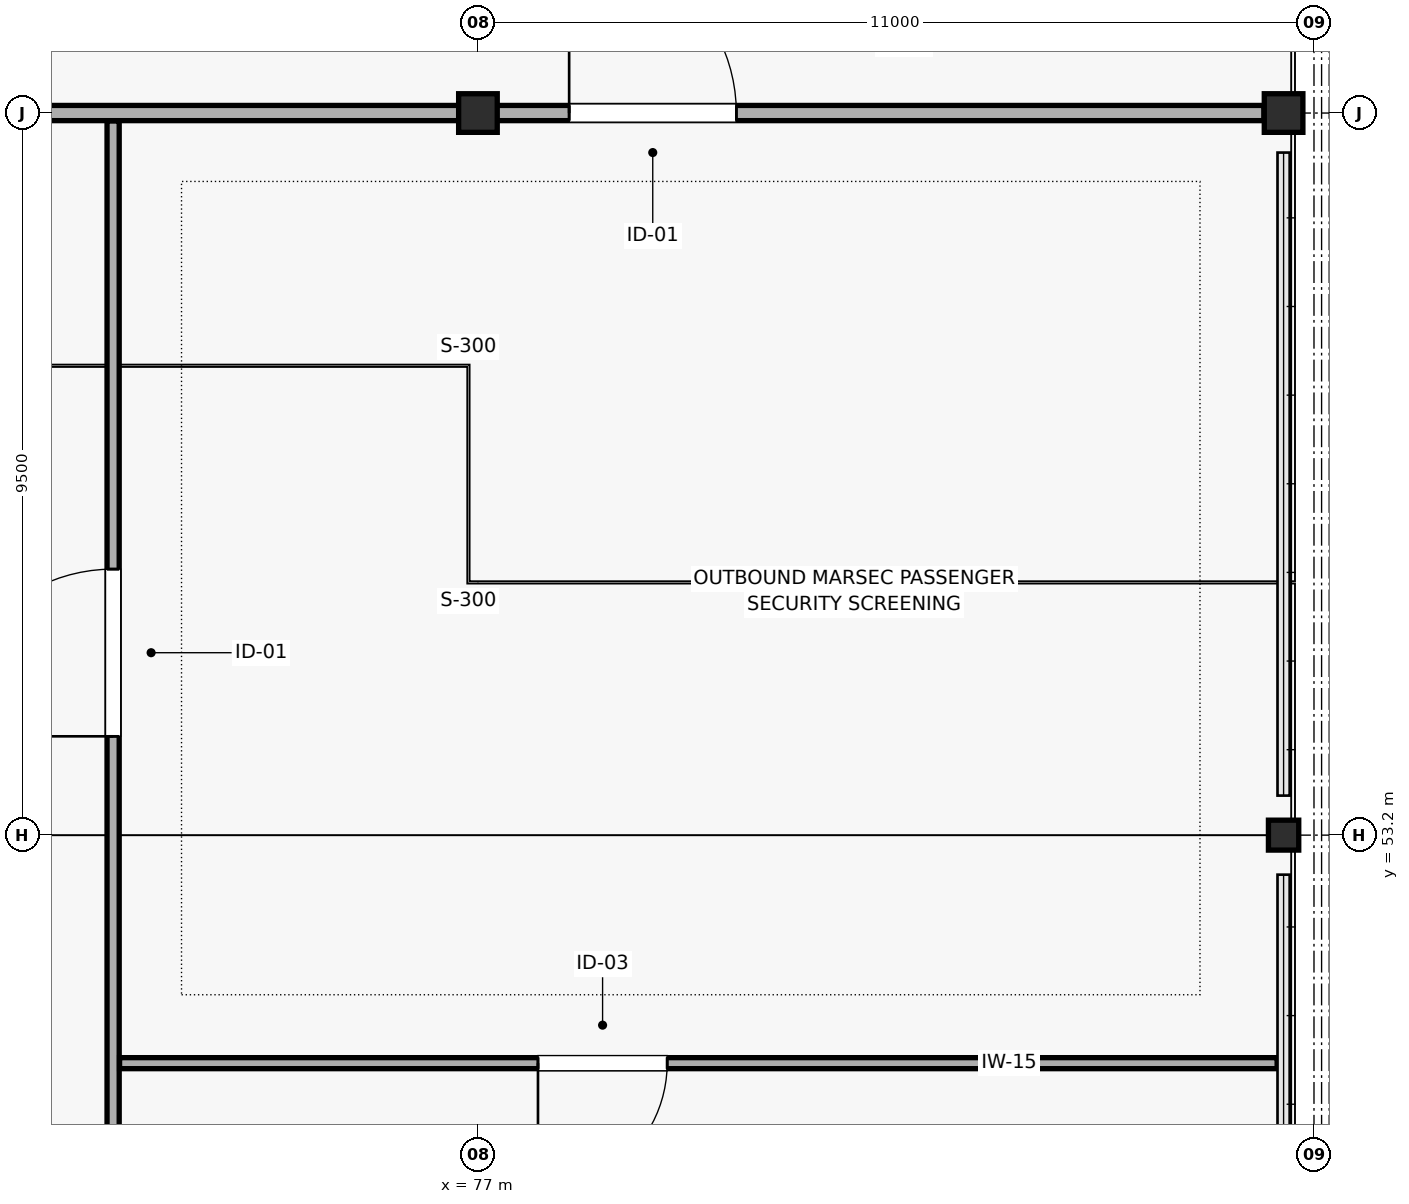
"""IFC4 building model, lengths in metres.
Left out: names, types, materials, properties, quantities, classifications, styles, units other than length and angle.
Written with IfcOpenShell. Run it as: python <this file> out.ifc"""

import sys

from ifc_helpers import new_model, si_unit, direction, frame, frame_2d, origin, origin_2d, place, context, subcontext, project, spatial, rectangle, hollow_circle, i_section, extrude, element, fill, save


model = new_model("IFC4")
c1 = context("Model", 3, precision=1e-05, world=origin(), true_north=direction((0.0, 1.0)))
c2 = subcontext(c1, "Body", "Model", "MODEL_VIEW")
j1 = project(units=[si_unit("LENGTHUNIT", "METRE"), si_unit("PLANEANGLEUNIT", "RADIAN")], contexts=[c1])
p1 = place(None, origin())
s1 = spatial("IfcSite", under=j1, at=p1, CompositionType="ELEMENT")
p2 = place(p1, origin())
s2 = spatial("IfcBuilding", under=s1, at=p2, CompositionType="ELEMENT")
p3 = place(p2, frame((0.0, 0.0, 5.4)))
s3 = spatial("IfcBuildingStorey", under=s2, at=p3, CompositionType="ELEMENT", Elevation=5.4)
for number, where, z_axis, x_axis in (
    (1, (77.0, 62.7, 0.0), (0.0, 0.0, 1.0), (1.0, 0.0, 0.0)),
    (2, (87.6, 62.7, 0.0), (0.0, 0.0, 1.0), (1.0, 0.0, 0.0)),
):
    element("IfcColumn", number, at=place(p3, frame(where, z_axis=z_axis, x_axis=x_axis)), inside=s3, PredefinedType="COLUMN", context=c2, shape_type="SweptSolid", body=[
        extrude(hollow_circle(Radius=0.254, WallThickness=0.012, at=origin_2d()), origin(), (0.0, 0.0, 1.0), 4.5),
    ])
p4 = place(p3, frame((87.6, 53.2, 0.0), z_axis=(0.0, 0.0, 1.0), x_axis=(1.0, 0.0, 0.0)))
e3 = element("IfcColumn", 3, at=p4, inside=s3, PredefinedType="COLUMN", context=c2, shape_type="SweptSolid", body=[
    extrude(i_section(OverallWidth=0.399, OverallDepth=0.394, WebThickness=0.023, FlangeThickness=0.037, FilletRadius=0.018, at=origin_2d()), origin(), (0.0, 0.0, 1.0), 4.5),
])
p5 = place(p3, frame((0.259, 62.7, 0.0), z_axis=(0.0, 0.0, 1.0), x_axis=(1.0, 0.0, 0.0)))
e4 = element("IfcWall", 4, at=p5, inside=s3, PredefinedType="PARTITIONING", context=c2, shape_type="SweptSolid", body=[
    extrude(rectangle(XDim=87.082, YDim=0.2, at=frame_2d((43.541, 0.0))), origin(), (0.0, 0.0, 1.0), 3.592),
])
p6 = place(p5, frame((15.941, 0.0, 0.0)))
e5 = element("IfcOpeningElement", 5, at=p6, cuts=e4, PredefinedType="OPENING", context=c2, shape_type="SweptSolid", body=[
    extrude(rectangle(XDim=2.2, YDim=2.5, at=frame_2d((1.1, 1.25))), frame((0.0, 0.11, 0.0), z_axis=(0.0, -1.0, 0.0), x_axis=(1.0, 0.0, 0.0)), (0.0, 0.0, 1.0), 0.22),
])
p7 = place(p5, frame((56.041, 0.0, 0.0)))
e6 = element("IfcOpeningElement", 6, at=p7, cuts=e4, PredefinedType="OPENING", context=c2, shape_type="SweptSolid", body=[
    extrude(rectangle(XDim=2.2, YDim=2.5, at=frame_2d((1.1, 1.25))), frame((0.0, 0.11, 0.0), z_axis=(0.0, -1.0, 0.0), x_axis=(1.0, 0.0, 0.0)), (0.0, 0.0, 1.0), 0.22),
])
p8 = place(p5, frame((77.941, 0.0, 0.0)))
e7 = element("IfcOpeningElement", 7, at=p8, cuts=e4, PredefinedType="OPENING", context=c2, shape_type="SweptSolid", body=[
    extrude(rectangle(XDim=2.2, YDim=2.5, at=frame_2d((1.1, 1.25))), frame((0.0, 0.11, 0.0), z_axis=(0.0, -1.0, 0.0), x_axis=(1.0, 0.0, 0.0)), (0.0, 0.0, 1.0), 0.22),
])
p9 = place(p3, frame((72.2, 34.685, 0.0), z_axis=(0.0, 0.0, 1.0), x_axis=(0.0, 1.0, 0.0)))
e8 = element("IfcWall", 8, at=p9, inside=s3, PredefinedType="PARTITIONING", context=c2, shape_type="SweptSolid", body=[
    extrude(rectangle(XDim=27.91, YDim=0.16, at=frame_2d((13.955, 0.0))), origin(), (0.0, 0.0, 1.0), 3.592),
])
p10 = place(p9, frame((6.215, 0.0, 0.0)))
e9 = element("IfcOpeningElement", 9, at=p10, cuts=e8, PredefinedType="OPENING", context=c2, shape_type="SweptSolid", body=[
    extrude(rectangle(XDim=2.2, YDim=2.5, at=frame_2d((1.1, 1.25))), frame((0.0, 0.09, 0.0), z_axis=(0.0, -1.0, 0.0), x_axis=(1.0, 0.0, 0.0)), (0.0, 0.0, 1.0), 0.18),
])
p11 = place(p9, frame((19.815, 0.0, 0.0)))
e10 = element("IfcOpeningElement", 10, at=p11, cuts=e8, PredefinedType="OPENING", context=c2, shape_type="SweptSolid", body=[
    extrude(rectangle(XDim=2.2, YDim=2.5, at=frame_2d((1.1, 1.25))), frame((0.0, 0.09, 0.0), z_axis=(0.0, -1.0, 0.0), x_axis=(1.0, 0.0, 0.0)), (0.0, 0.0, 1.0), 0.18),
])
p12 = place(p3, frame((72.285, 50.2, 0.0), z_axis=(0.0, 0.0, 1.0), x_axis=(1.0, 0.0, 0.0)))
e11 = element("IfcWall", 11, at=p12, inside=s3, PredefinedType="PARTITIONING", context=c2, shape_type="SweptSolid", body=[
    extrude(rectangle(XDim=15.23, YDim=0.145, at=frame_2d((7.615, 0.0))), origin(), (0.0, 0.0, 1.0), 4.5),
])
p13 = place(p12, frame((5.505, 0.0, 0.0)))
e12 = element("IfcOpeningElement", 12, at=p13, cuts=e11, PredefinedType="OPENING", context=c2, shape_type="SweptSolid", body=[
    extrude(rectangle(XDim=1.7, YDim=2.35, at=frame_2d((0.85, 1.175))), frame((0.0, 0.083, 0.0), z_axis=(0.0, -1.0, 0.0), x_axis=(1.0, 0.0, 0.0)), (0.0, 0.0, 1.0), 0.165),
])
p14 = place(p8, origin())
e13 = element("IfcDoor", 13, at=p14, inside=s3, OperationType="SINGLE_SWING_LEFT", PredefinedType="DOOR", context=c2, shape_type="SweptSolid", body=[
    extrude(rectangle(XDim=2.2, YDim=2.5, at=frame_2d((1.1, 1.25))), frame((0.0, 0.025, 0.0), z_axis=(0.0, -1.0, 0.0), x_axis=(1.0, 0.0, 0.0)), (0.0, 0.0, 1.0), 0.05),
])
fill(e7, e13)
p15 = place(p11, origin())
e14 = element("IfcDoor", 14, at=p15, inside=s3, OperationType="SINGLE_SWING_LEFT", PredefinedType="DOOR", context=c2, shape_type="SweptSolid", body=[
    extrude(rectangle(XDim=2.2, YDim=2.5, at=frame_2d((1.1, 1.25))), frame((0.0, 0.025, 0.0), z_axis=(0.0, -1.0, 0.0), x_axis=(1.0, 0.0, 0.0)), (0.0, 0.0, 1.0), 0.05),
])
fill(e10, e14)
p16 = place(p13, frame((1.7, 0.0, 0.0), z_axis=(0.0, 0.0, 1.0), x_axis=(-1.0, 0.0, 0.0)))
e15 = element("IfcDoor", 15, at=p16, inside=s3, OperationType="SINGLE_SWING_RIGHT", PredefinedType="DOOR", context=c2, shape_type="SweptSolid", body=[
    extrude(rectangle(XDim=1.7, YDim=2.35, at=frame_2d((0.85, 1.175))), frame((0.0, 0.025, 0.0), z_axis=(0.0, -1.0, 0.0), x_axis=(1.0, 0.0, 0.0)), (0.0, 0.0, 1.0), 0.05),
])
fill(e12, e15)
save(model, sys.argv[1])
